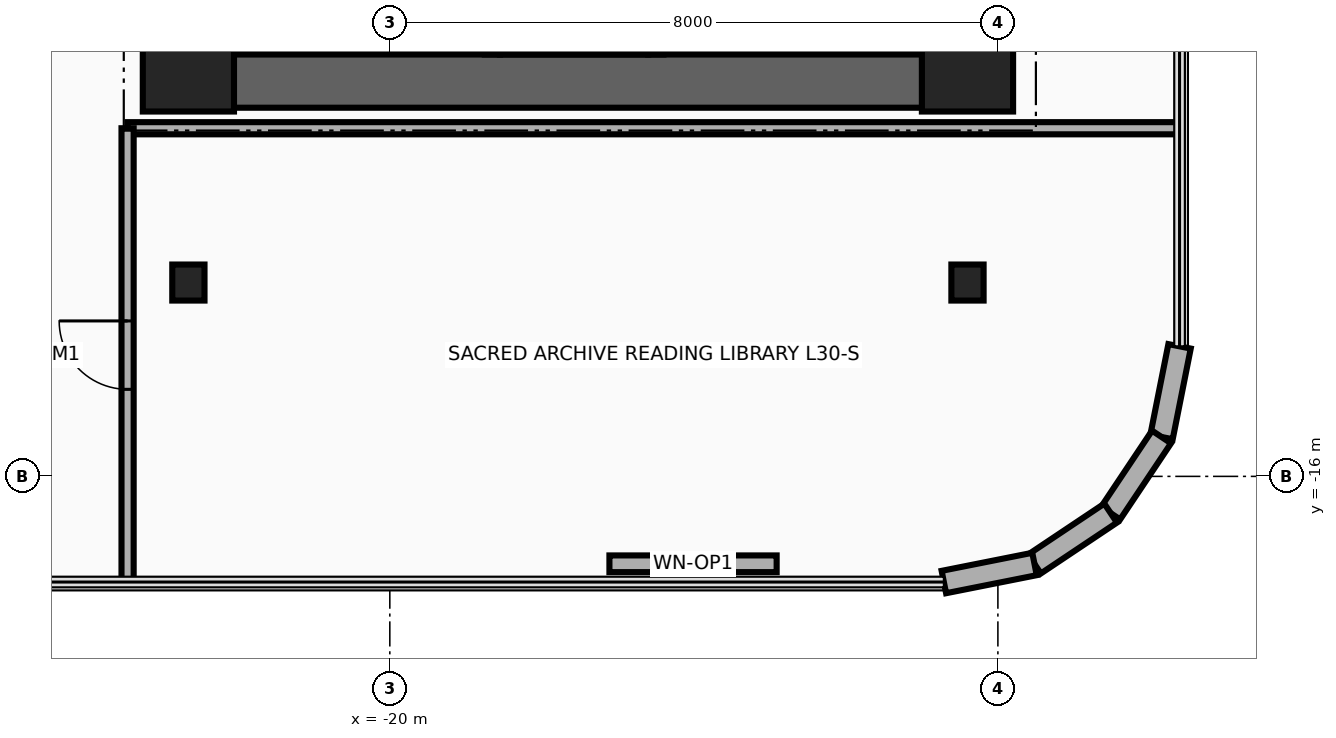
"""IFC4 building model, lengths in metres.
Left out: names, types, materials, properties, quantities, classifications, styles, units other than length and angle.
Written with IfcOpenShell. Run it as: python <this file> out.ifc"""

import sys

from ifc_helpers import new_model, si_unit, direction, frame, frame_2d, origin, origin_2d, place, context, subcontext, project, spatial, rectangle, i_section, extrude, source, transform, mapped, element, fill, save


model = new_model("IFC4")
c1 = context("Model", 3, precision=1e-05, world=origin(), true_north=direction((0.0, 1.0)))
c2 = subcontext(c1, "Body", "Model", "MODEL_VIEW")
j1 = project(units=[si_unit("LENGTHUNIT", "METRE"), si_unit("PLANEANGLEUNIT", "RADIAN")], contexts=[c1])
p1 = place(None, origin())
s1 = spatial("IfcSite", under=j1, at=p1, CompositionType="ELEMENT")
p2 = place(p1, origin())
s2 = spatial("IfcBuilding", under=s1, at=p2, CompositionType="ELEMENT")
p3 = place(p2, frame((0.0, 0.0, 120.5)))
s3 = spatial("IfcBuildingStorey", under=s2, at=p3, CompositionType="ELEMENT", Elevation=120.5)
for number, where, z_axis, x_axis in (
    (1, (-22.16, -10.45, 0.0), (0.0, 0.0, 1.0), (0.0, 1.0, 0.0)),
    (2, (-18.83, -10.45, 0.0), (0.0, 0.0, 1.0), (0.0, 1.0, 0.0)),
):
    element("IfcWall", number, at=place(p3, frame(where, z_axis=z_axis, x_axis=x_axis)), inside=s3, PredefinedType="SHEAR", context=c2, shape_type="SweptSolid", body=[
        extrude(rectangle(XDim=8.67, YDim=0.22, at=frame_2d((4.335, 0.0))), origin(), (0.0, 0.0, 1.0), 3.46),
    ])
p4 = place(p3, frame((-22.65, -11.15, 0.0), z_axis=(0.0, 0.0, 1.0), x_axis=(0.0, 1.0, 0.0)))
e3 = element("IfcWall", 3, at=p4, inside=s3, PredefinedType="SHEAR", context=c2, shape_type="SweptSolid", body=[
    extrude(rectangle(XDim=22.3, YDim=0.7, at=frame_2d((11.15, 0.0))), origin(), (0.0, 0.0, 1.0), 3.46),
])
p5 = place(p3, frame((-22.65, -10.8, 0.0), z_axis=(0.0, 0.0, 1.0), x_axis=(1.0, 0.0, 0.0)))
e4 = element("IfcWall", 4, at=p5, inside=s3, PredefinedType="SHEAR", context=c2, shape_type="SweptSolid", body=[
    extrude(rectangle(XDim=10.25, YDim=0.7, at=frame_2d((5.125, 0.0))), origin(), (0.0, 0.0, 1.0), 3.46),
])
m1 = source(origin(), c2, "Body", "SweptSolid", [
    extrude(rectangle(XDim=1.2, YDim=1.2, at=origin_2d()), origin(), (0.0, 0.0, 1.0), 3.7),
])
for number, where, z_axis, x_axis in (
    (5, (-22.65, -10.6, 0.0), (0.0, 0.0, 1.0), (1.0, 0.0, 0.0)),
    (6, (-12.4, -10.6, 0.0), (0.0, 0.0, 1.0), (1.0, 0.0, 0.0)),
):
    element("IfcColumn", number, at=place(p3, frame(where, z_axis=z_axis, x_axis=x_axis)), inside=s3, PredefinedType="COLUMN", context=c2, shape_type="MappedRepresentation", body=[
        mapped(m1, transform((0.0, 0.0, 0.0), x_axis=(1.0, 0.0, 0.0), y_axis=(0.0, 1.0, 0.0), z_axis=(0.0, 0.0, 1.0), scale=1.0)),
    ])
m2 = source(origin(), c2, "Body", "SweptSolid", [
    extrude(i_section(OverallWidth=0.424, OverallDepth=0.474, WebThickness=0.048, FlangeThickness=0.077, at=origin_2d()), origin(), (0.0, 0.0, 1.0), 3.7),
])
for number, where, z_axis, x_axis in (
    (7, (-22.65, -13.45, 0.0), (0.0, 0.0, 1.0), (1.0, 0.0, 0.0)),
    (8, (-12.4, -13.45, 0.0), (0.0, 0.0, 1.0), (1.0, 0.0, 0.0)),
):
    element("IfcColumn", number, at=place(p3, frame(where, z_axis=z_axis, x_axis=x_axis)), inside=s3, PredefinedType="COLUMN", context=c2, shape_type="MappedRepresentation", body=[
        mapped(m2, transform((0.0, 0.0, 0.0), x_axis=(1.0, 0.0, 0.0), y_axis=(0.0, 1.0, 0.0), z_axis=(0.0, 0.0, 1.0), scale=1.0)),
    ])
p6 = place(p3, frame((-9.61, -14.289, 0.0), z_axis=(0.0, 0.0, 1.0), x_axis=(-0.194996050505, -0.980804027463, 0.0)))
e9 = element("IfcWall", 9, at=p6, inside=s3, PredefinedType="SOLIDWALL", context=c2, shape_type="SweptSolid", body=[
    extrude(rectangle(XDim=1.216, YDim=0.3, at=frame_2d((0.608, 0.0))), origin(), (0.0, 0.0, 1.0), 3.46),
])
for number, where, z_axis, x_axis in (
    (10, (-9.847, -15.482, 0.0), (0.0, 0.0, 1.0), (-0.556, -0.831, 0.0)),
    (11, (-10.517, -16.483, 0.0), (0.0, 0.0, 1.0), (-0.831, -0.556, 0.0)),
):
    element("IfcWall", number, at=place(p3, frame(where, z_axis=z_axis, x_axis=x_axis)), inside=s3, PredefinedType="SOLIDWALL", context=c2, shape_type="SweptSolid", body=[
        extrude(rectangle(XDim=1.205, YDim=0.3, at=frame_2d((0.603, 0.0))), origin(), (0.0, 0.0, 1.0), 3.46),
    ])
p7 = place(p3, frame((-11.518, -17.153, 0.0), z_axis=(0.0, 0.0, 1.0), x_axis=(-0.980804027463, -0.194996050505, 0.0)))
e12 = element("IfcWall", 12, at=p7, inside=s3, PredefinedType="SOLIDWALL", context=c2, shape_type="SweptSolid", body=[
    extrude(rectangle(XDim=1.216, YDim=0.3, at=frame_2d((0.608, 0.0))), origin(), (0.0, 0.0, 1.0), 3.46),
])
p8 = place(p3, frame((-14.911, -17.15, 0.0), z_axis=(0.0, 0.0, 1.0), x_axis=(-1.0, 0.0, 0.0)))
e13 = element("IfcWall", 13, at=p8, inside=s3, PredefinedType="SOLIDWALL", context=c2, shape_type="SweptSolid", body=[
    extrude(rectangle(XDim=2.2, YDim=0.22, at=frame_2d((1.1, 0.0))), origin(), (0.0, 0.0, 1.0), 3.46),
])
p9 = place(p8, frame((0.65, 0.0, 0.95)))
e14 = element("IfcOpeningElement", 14, at=p9, cuts=e13, PredefinedType="OPENING", context=c2, shape_type="SweptSolid", body=[
    extrude(rectangle(XDim=0.9, YDim=1.3, at=frame_2d((0.45, 0.65))), frame((0.0, 0.125, 0.0), z_axis=(0.0, -1.0, 0.0), x_axis=(1.0, 0.0, 0.0)), (0.0, 0.0, 1.0), 0.25),
])
for number, where, z_axis, x_axis in (
    (15, (-18.65, -10.45, 0.0), (0.0, 0.0, 1.0), (0.0, 1.0, 0.0)),
    (16, (-16.5, -10.45, 0.0), (0.0, 0.0, 1.0), (0.0, 1.0, 0.0)),
):
    element("IfcWall", number, at=place(p3, frame(where, z_axis=z_axis, x_axis=x_axis)), inside=s3, PredefinedType="MOVABLE", context=c2, shape_type="SweptSolid", body=[
        extrude(rectangle(XDim=2.35, YDim=0.2, at=frame_2d((1.175, 0.0))), origin(), (0.0, 0.0, 1.0), 2.666),
    ])
p10 = place(p3, frame((-18.55, -10.35, 0.0), z_axis=(0.0, 0.0, 1.0), x_axis=(1.0, 0.0, 0.0)))
e17 = element("IfcWall", 17, at=p10, inside=s3, PredefinedType="MOVABLE", context=c2, shape_type="SweptSolid", body=[
    extrude(rectangle(XDim=1.95, YDim=0.2, at=frame_2d((0.975, 0.0))), origin(), (0.0, 0.0, 1.0), 2.666),
])
p11 = place(p3, frame((-23.45, -11.42, 0.0), z_axis=(0.0, 0.0, 1.0), x_axis=(1.0, 0.0, 0.0)))
e18 = element("IfcWall", 18, at=p11, inside=s3, PredefinedType="PARTITIONING", context=c2, shape_type="SweptSolid", body=[
    extrude(rectangle(XDim=13.84, YDim=0.16, at=frame_2d((6.92, 0.0))), origin(), (0.0, 0.0, 1.0), 2.834),
])
p12 = place(p3, frame((-23.45, -17.39, 0.0), z_axis=(0.0, 0.0, 1.0), x_axis=(0.0, 1.0, 0.0)))
e19 = element("IfcWall", 19, at=p12, inside=s3, PredefinedType="PARTITIONING", context=c2, shape_type="SweptSolid", body=[
    extrude(rectangle(XDim=5.97, YDim=0.16, at=frame_2d((2.985, 0.0))), origin(), (0.0, 0.0, 1.0), 3.46),
])
p13 = place(p12, frame((2.535, 0.0, 0.0)))
e20 = element("IfcOpeningElement", 20, at=p13, cuts=e19, PredefinedType="OPENING", context=c2, shape_type="SweptSolid", body=[
    extrude(rectangle(XDim=0.9, YDim=2.1, at=frame_2d((0.45, 1.05))), frame((0.0, 0.095, 0.0), z_axis=(0.0, -1.0, 0.0), x_axis=(1.0, 0.0, 0.0)), (0.0, 0.0, 1.0), 0.19),
])
p14 = place(p9, origin())
e21 = element("IfcWindow", 21, at=p14, inside=s3, PartitioningType="SINGLE_PANEL", PredefinedType="WINDOW", context=c2, shape_type="SweptSolid", body=[
    extrude(rectangle(XDim=0.9, YDim=1.3, at=frame_2d((0.45, 0.65))), frame((0.0, 0.03, 0.0), z_axis=(0.0, -1.0, 0.0), x_axis=(1.0, 0.0, 0.0)), (0.0, 0.0, 1.0), 0.06),
])
fill(e14, e21)
p15 = place(p13, origin())
e22 = element("IfcDoor", 22, at=p15, inside=s3, OperationType="SINGLE_SWING_RIGHT", PredefinedType="DOOR", context=c2, shape_type="SweptSolid", body=[
    extrude(rectangle(XDim=0.9, YDim=2.1, at=frame_2d((0.45, 1.05))), frame((0.0, 0.025, 0.0), z_axis=(0.0, -1.0, 0.0), x_axis=(1.0, 0.0, 0.0)), (0.0, 0.0, 1.0), 0.05),
])
fill(e20, e22)
save(model, sys.argv[1])
